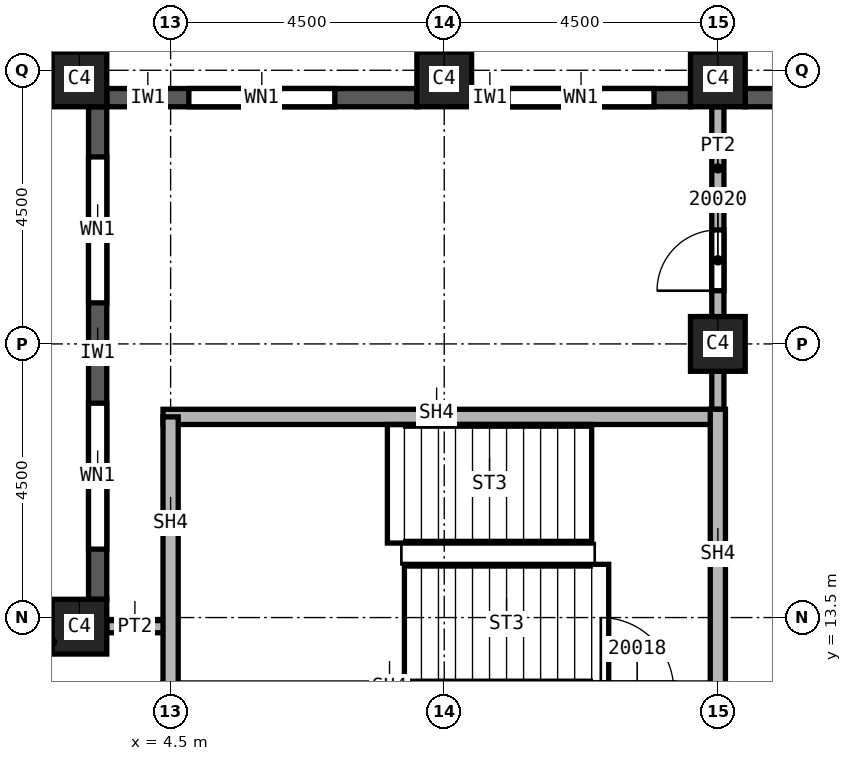
"""IFC4 building model, lengths in metres.
Left out: names, types, materials, properties, quantities, classifications, styles, units other than length and angle.
Written with IfcOpenShell. Run it as: python <this file> out.ifc"""

import sys

from ifc_helpers import new_model, si_unit, direction, frame, frame_2d, origin, origin_2d, place, context, subcontext, project, spatial, rectangle, extrude, element, fill, save


model = new_model("IFC4")
c1 = context("Model", 3, precision=1e-05, world=origin(), true_north=direction((0.0, 1.0)))
c2 = subcontext(c1, "Body", "Model", "MODEL_VIEW")
j1 = project(units=[si_unit("LENGTHUNIT", "METRE"), si_unit("PLANEANGLEUNIT", "RADIAN")], contexts=[c1])
p1 = place(None, origin())
s1 = spatial("IfcSite", under=j1, at=p1, CompositionType="ELEMENT")
p2 = place(p1, origin())
s2 = spatial("IfcBuilding", under=s1, at=p2, CompositionType="ELEMENT")
p3 = place(p2, frame((0.0, 0.0, 286.0)))
s3 = spatial("IfcBuildingStorey", under=s2, at=p3, CompositionType="ELEMENT", Elevation=286.0)
for number, where, z_axis, x_axis in (
    (1, (13.5, 18.0, 0.0), (0.0, 0.0, 1.0), (1.0, 0.0, 0.0)),
    (2, (3.0, 22.35, 0.0), (0.0, 0.0, 1.0), (1.0, 0.0, 0.0)),
    (3, (9.0, 22.35, 0.0), (0.0, 0.0, 1.0), (1.0, 0.0, 0.0)),
    (4, (13.5, 22.35, 0.0), (0.0, 0.0, 1.0), (1.0, 0.0, 0.0)),
    (5, (3.0, 13.35, 0.0), (0.0, 0.0, 1.0), (1.0, 0.0, 0.0)),
):
    element("IfcColumn", number, at=place(p3, frame(where, z_axis=z_axis, x_axis=x_axis)), inside=s3, PredefinedType="COLUMN", context=c2, shape_type="SweptSolid", body=[
        extrude(rectangle(XDim=0.9, YDim=0.9, at=origin_2d()), origin(), (0.0, 0.0, 1.0), 3.72),
    ])
p4 = place(p3, frame((17.55, 22.05, 0.0), z_axis=(0.0, 0.0, 1.0), x_axis=(-1.0, 0.0, 0.0)))
e6 = element("IfcWall", 6, at=p4, inside=s3, PredefinedType="SOLIDWALL", context=c2, shape_type="SweptSolid", body=[
    extrude(rectangle(XDim=3.6, YDim=0.3, at=frame_2d((1.8, 0.0))), origin(), (0.0, 0.0, 1.0), 3.12),
])
p5 = place(p4, frame((0.775, 0.0, 0.8)))
e7 = element("IfcOpeningElement", 7, at=p5, cuts=e6, PredefinedType="OPENING", context=c2, shape_type="SweptSolid", body=[
    extrude(rectangle(XDim=1.0, YDim=1.95, at=frame_2d((0.5, 0.975))), frame((0.0, 0.15, 0.0), z_axis=(0.0, -1.0, 0.0), x_axis=(1.0, 0.0, 0.0)), (0.0, 0.0, 1.0), 0.3),
])
p6 = place(p4, frame((2.375, 0.0, 0.8)))
e8 = element("IfcOpeningElement", 8, at=p6, cuts=e6, PredefinedType="OPENING", context=c2, shape_type="SweptSolid", body=[
    extrude(rectangle(XDim=0.6, YDim=1.95, at=frame_2d((0.3, 0.975))), frame((0.0, 0.15, 0.0), z_axis=(0.0, -1.0, 0.0), x_axis=(1.0, 0.0, 0.0)), (0.0, 0.0, 1.0), 0.3),
])
p7 = place(p3, frame((13.05, 22.05, 0.0), z_axis=(0.0, 0.0, 1.0), x_axis=(-1.0, 0.0, 0.0)))
e9 = element("IfcWall", 9, at=p7, inside=s3, PredefinedType="SOLIDWALL", context=c2, shape_type="SweptSolid", body=[
    extrude(rectangle(XDim=3.6, YDim=0.3, at=frame_2d((1.8, 0.0))), origin(), (0.0, 0.0, 1.0), 3.12),
])
p8 = place(p7, frame((0.6, 0.0, 0.8)))
e10 = element("IfcOpeningElement", 10, at=p8, cuts=e9, PredefinedType="OPENING", context=c2, shape_type="SweptSolid", body=[
    extrude(rectangle(XDim=2.4, YDim=1.95, at=frame_2d((1.2, 0.975))), frame((0.0, 0.15, 0.0), z_axis=(0.0, -1.0, 0.0), x_axis=(1.0, 0.0, 0.0)), (0.0, 0.0, 1.0), 0.3),
])
p9 = place(p3, frame((8.55, 22.05, 0.0), z_axis=(0.0, 0.0, 1.0), x_axis=(-1.0, 0.0, 0.0)))
e11 = element("IfcWall", 11, at=p9, inside=s3, PredefinedType="SOLIDWALL", context=c2, shape_type="SweptSolid", body=[
    extrude(rectangle(XDim=5.1, YDim=0.3, at=frame_2d((2.55, 0.0))), origin(), (0.0, 0.0, 1.0), 3.12),
])
p10 = place(p9, frame((1.35, 0.0, 0.8)))
e12 = element("IfcOpeningElement", 12, at=p10, cuts=e11, PredefinedType="OPENING", context=c2, shape_type="SweptSolid", body=[
    extrude(rectangle(XDim=2.4, YDim=1.95, at=frame_2d((1.2, 0.975))), frame((0.0, 0.15, 0.0), z_axis=(0.0, -1.0, 0.0), x_axis=(1.0, 0.0, 0.0)), (0.0, 0.0, 1.0), 0.3),
])
p11 = place(p3, frame((3.3, 21.9, 0.0), z_axis=(0.0, 0.0, 1.0), x_axis=(0.0, -1.0, 0.0)))
e13 = element("IfcWall", 13, at=p11, inside=s3, PredefinedType="SOLIDWALL", context=c2, shape_type="SweptSolid", body=[
    extrude(rectangle(XDim=8.1, YDim=0.3, at=frame_2d((4.05, 0.0))), origin(), (0.0, 0.0, 1.0), 3.12),
])
p12 = place(p11, frame((0.825, 0.0, 0.8)))
e14 = element("IfcOpeningElement", 14, at=p12, cuts=e13, PredefinedType="OPENING", context=c2, shape_type="SweptSolid", body=[
    extrude(rectangle(XDim=2.4, YDim=1.95, at=frame_2d((1.2, 0.975))), frame((0.0, 0.15, 0.0), z_axis=(0.0, -1.0, 0.0), x_axis=(1.0, 0.0, 0.0)), (0.0, 0.0, 1.0), 0.3),
])
p13 = place(p11, frame((4.875, 0.0, 0.8)))
e15 = element("IfcOpeningElement", 15, at=p13, cuts=e13, PredefinedType="OPENING", context=c2, shape_type="SweptSolid", body=[
    extrude(rectangle(XDim=2.4, YDim=1.95, at=frame_2d((1.2, 0.975))), frame((0.0, 0.15, 0.0), z_axis=(0.0, -1.0, 0.0), x_axis=(1.0, 0.0, 0.0)), (0.0, 0.0, 1.0), 0.3),
])
p14 = place(p3, frame((3.45, 13.35, 0.0), z_axis=(0.0, 0.0, 1.0), x_axis=(1.0, 0.0, 0.0)))
e16 = element("IfcWall", 16, at=p14, inside=s3, PredefinedType="PARTITIONING", context=c2, shape_type="SweptSolid", body=[
    extrude(rectangle(XDim=1.049, YDim=0.2, at=frame_2d((0.524, 0.0))), origin(), (0.0, 0.0, 1.0), 3.72),
])
p15 = place(p3, frame((13.5, 16.675, 0.0), z_axis=(0.0, 0.0, 1.0), x_axis=(0.0, 1.0, 0.0)))
e17 = element("IfcWall", 17, at=p15, inside=s3, PredefinedType="PARTITIONING", context=c2, shape_type="SweptSolid", body=[
    extrude(rectangle(XDim=5.225, YDim=0.2, at=frame_2d((2.612, 0.0))), origin(), (0.0, 0.0, 1.0), 3.72),
])
p16 = place(p15, frame((2.2, 0.0, 0.0)))
e18 = element("IfcOpeningElement", 18, at=p16, cuts=e17, PredefinedType="OPENING", context=c2, shape_type="SweptSolid", body=[
    extrude(rectangle(XDim=1.0, YDim=2.1, at=frame_2d((0.5, 1.05))), frame((0.0, 0.1, 0.0), z_axis=(0.0, -1.0, 0.0), x_axis=(1.0, 0.0, 0.0)), (0.0, 0.0, 1.0), 0.2),
])
p17 = place(p3, frame((4.375, 16.8, 0.0), z_axis=(0.0, 0.0, 1.0), x_axis=(1.0, 0.0, 0.0)))
e19 = element("IfcWall", 19, at=p17, inside=s3, PredefinedType="SOLIDWALL", context=c2, shape_type="SweptSolid", body=[
    extrude(rectangle(XDim=9.125, YDim=0.25, at=frame_2d((4.562, 0.0))), origin(), (0.0, 0.0, 1.0), 3.72),
])
p18 = place(p3, frame((4.5, 12.3, 0.0), z_axis=(0.0, 0.0, 1.0), x_axis=(0.0, 1.0, 0.0)))
e20 = element("IfcWall", 20, at=p18, inside=s3, PredefinedType="SOLIDWALL", context=c2, shape_type="SweptSolid", body=[
    extrude(rectangle(XDim=4.5, YDim=0.25, at=frame_2d((2.25, 0.0))), origin(), (0.0, 0.0, 1.0), 3.72),
])
p19 = place(p3, frame((13.5, 12.175, 0.0), z_axis=(0.0, 0.0, 1.0), x_axis=(0.0, 1.0, 0.0)))
e21 = element("IfcWall", 21, at=p19, inside=s3, PredefinedType="SOLIDWALL", context=c2, shape_type="SweptSolid", body=[
    extrude(rectangle(XDim=4.75, YDim=0.25, at=frame_2d((2.375, 0.0))), origin(), (0.0, 0.0, 1.0), 3.72),
])
p20 = place(p8, origin())
e22 = element("IfcWindow", 22, at=p20, inside=s3, PartitioningType="SINGLE_PANEL", PredefinedType="WINDOW", context=c2, shape_type="SweptSolid", body=[
    extrude(rectangle(XDim=2.4, YDim=1.95, at=frame_2d((1.2, 0.975))), frame((0.0, 0.03, 0.0), z_axis=(0.0, -1.0, 0.0), x_axis=(1.0, 0.0, 0.0)), (0.0, 0.0, 1.0), 0.06),
])
fill(e10, e22)
p21 = place(p10, origin())
e23 = element("IfcWindow", 23, at=p21, inside=s3, PartitioningType="SINGLE_PANEL", PredefinedType="WINDOW", context=c2, shape_type="SweptSolid", body=[
    extrude(rectangle(XDim=2.4, YDim=1.95, at=frame_2d((1.2, 0.975))), frame((0.0, 0.03, 0.0), z_axis=(0.0, -1.0, 0.0), x_axis=(1.0, 0.0, 0.0)), (0.0, 0.0, 1.0), 0.06),
])
fill(e12, e23)
p22 = place(p12, origin())
e24 = element("IfcWindow", 24, at=p22, inside=s3, PartitioningType="SINGLE_PANEL", PredefinedType="WINDOW", context=c2, shape_type="SweptSolid", body=[
    extrude(rectangle(XDim=2.4, YDim=1.95, at=frame_2d((1.2, 0.975))), frame((0.0, 0.03, 0.0), z_axis=(0.0, -1.0, 0.0), x_axis=(1.0, 0.0, 0.0)), (0.0, 0.0, 1.0), 0.06),
])
fill(e14, e24)
p23 = place(p13, origin())
e25 = element("IfcWindow", 25, at=p23, inside=s3, PartitioningType="SINGLE_PANEL", PredefinedType="WINDOW", context=c2, shape_type="SweptSolid", body=[
    extrude(rectangle(XDim=2.4, YDim=1.95, at=frame_2d((1.2, 0.975))), frame((0.0, 0.03, 0.0), z_axis=(0.0, -1.0, 0.0), x_axis=(1.0, 0.0, 0.0)), (0.0, 0.0, 1.0), 0.06),
])
fill(e15, e25)
p24 = place(p16, origin())
e26 = element("IfcDoor", 26, at=p24, inside=s3, OperationType="SINGLE_SWING_LEFT", PredefinedType="DOOR", context=c2, shape_type="SweptSolid", body=[
    extrude(rectangle(XDim=1.0, YDim=2.1, at=frame_2d((0.5, 1.05))), frame((0.0, 0.025, 0.0), z_axis=(0.0, -1.0, 0.0), x_axis=(1.0, 0.0, 0.0)), (0.0, 0.0, 1.0), 0.05),
])
fill(e18, e26)
save(model, sys.argv[1])
